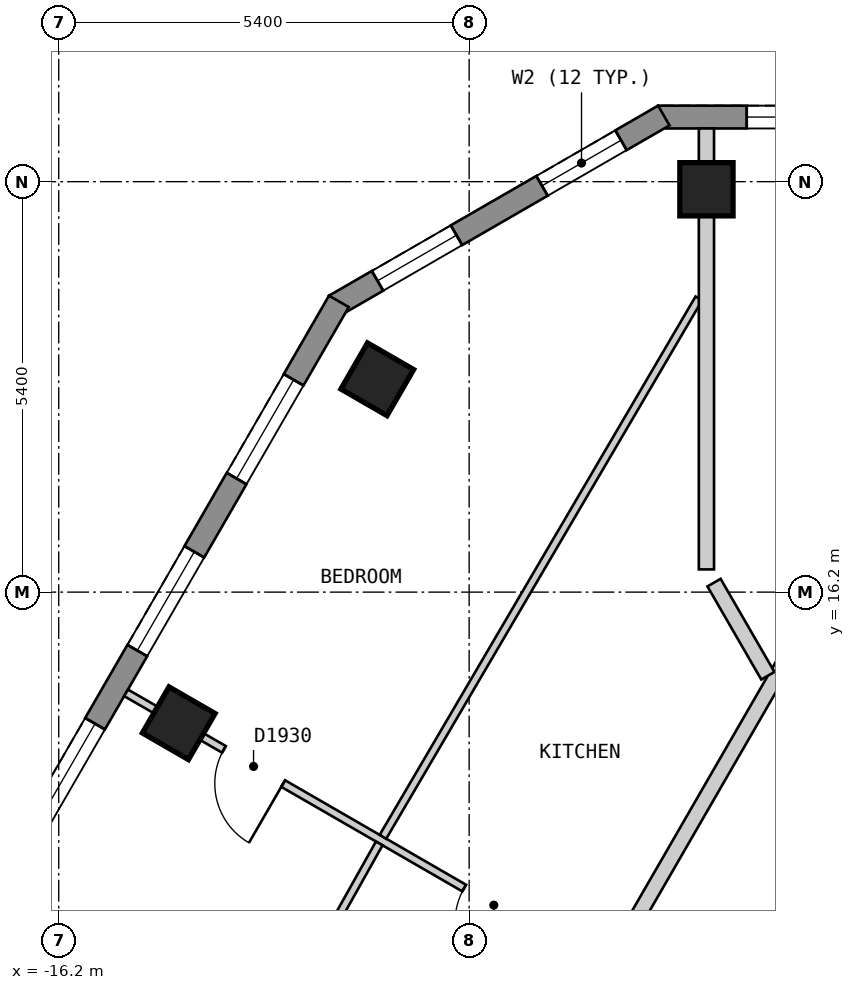
"""IFC4 building model, lengths in metres.
Left out: names, types, materials, properties, quantities, classifications, styles, units other than length and angle.
Written with IfcOpenShell. Run it as: python <this file> out.ifc"""

import sys

from ifc_helpers import new_model, si_unit, direction, frame, frame_2d, origin, origin_2d, place, context, subcontext, project, spatial, polyline, rectangle, outline, extrude, element, fill, save


model = new_model("IFC4")
c1 = context("Model", 3, precision=1e-05, world=origin(), true_north=direction((0.0, 1.0)))
c2 = subcontext(c1, "Body", "Model", "MODEL_VIEW")
j1 = project(units=[si_unit("LENGTHUNIT", "METRE"), si_unit("PLANEANGLEUNIT", "RADIAN")], contexts=[c1])
p1 = place(None, origin())
s1 = spatial("IfcSite", under=j1, at=p1, CompositionType="ELEMENT")
p2 = place(p1, origin())
s2 = spatial("IfcBuilding", under=s1, at=p2, CompositionType="ELEMENT")
p3 = place(p2, frame((0.0, 0.0, 226.8)))
s3 = spatial("IfcBuildingStorey", under=s2, at=p3, CompositionType="ELEMENT", Elevation=226.8)
for number, where, z_axis, x_axis in (
    (1, (-7.678, 21.5, 0.0), (0.0, 0.0, 1.0), (-1.0, 0.0, 0.0)),
    (2, (-12.009, 19.0, 0.0), (0.0, 0.0, 1.0), (-0.5, -0.866, 0.0)),
    (3, (-14.621, 14.475, 0.0), (0.0, 0.0, 1.0), (-0.5, -0.866, 0.0)),
):
    element("IfcColumn", number, at=place(p3, frame(where, z_axis=z_axis, x_axis=x_axis)), inside=s3, PredefinedType="COLUMN", context=c2, shape_type="SweptSolid", body=[
        extrude(rectangle(XDim=0.7, YDim=0.7, at=origin_2d()), origin(), (0.0, 0.0, 1.0), 3.0),
    ])
p4 = place(p3, frame((8.314, 22.45, 0.0), z_axis=(0.0, 0.0, 1.0), x_axis=(-1.0, 0.0, 0.0)))
e4 = element("IfcWall", 4, at=p4, inside=s3, PredefinedType="SOLIDWALL", context=c2, shape_type="SweptSolid", body=[
    extrude(outline(polyline([(0.0, -0.15), (16.628, -0.15), (16.548, 0.15), (0.08, 0.15), (0.0, -0.15)])), origin(), (0.0, 0.0, 1.0), 2.7),
])
p5 = place(p4, frame((1.165, 0.0, 0.15)))
e5 = element("IfcOpeningElement", 5, at=p5, cuts=e4, PredefinedType="OPENING", context=c2, shape_type="SweptSolid", body=[
    extrude(rectangle(XDim=1.5, YDim=2.1, at=frame_2d((0.75, 1.05))), frame((0.0, 0.16, 0.0), z_axis=(0.0, -1.0, 0.0), x_axis=(1.0, 0.0, 0.0)), (0.0, 0.0, 1.0), 0.32),
])
p6 = place(p4, frame((3.724, 0.0, 0.15)))
e6 = element("IfcOpeningElement", 6, at=p6, cuts=e4, PredefinedType="OPENING", context=c2, shape_type="SweptSolid", body=[
    extrude(rectangle(XDim=1.5, YDim=2.1, at=frame_2d((0.75, 1.05))), frame((0.0, 0.16, 0.0), z_axis=(0.0, -1.0, 0.0), x_axis=(1.0, 0.0, 0.0)), (0.0, 0.0, 1.0), 0.32),
])
p7 = place(p4, frame((6.284, 0.0, 0.15)))
e7 = element("IfcOpeningElement", 7, at=p7, cuts=e4, PredefinedType="OPENING", context=c2, shape_type="SweptSolid", body=[
    extrude(rectangle(XDim=1.5, YDim=2.1, at=frame_2d((0.75, 1.05))), frame((0.0, 0.16, 0.0), z_axis=(0.0, -1.0, 0.0), x_axis=(1.0, 0.0, 0.0)), (0.0, 0.0, 1.0), 0.32),
])
p8 = place(p4, frame((8.843, 0.0, 0.15)))
e8 = element("IfcOpeningElement", 8, at=p8, cuts=e4, PredefinedType="OPENING", context=c2, shape_type="SweptSolid", body=[
    extrude(rectangle(XDim=1.5, YDim=2.1, at=frame_2d((0.75, 1.05))), frame((0.0, 0.16, 0.0), z_axis=(0.0, -1.0, 0.0), x_axis=(1.0, 0.0, 0.0)), (0.0, 0.0, 1.0), 0.32),
])
p9 = place(p4, frame((11.403, 0.0, 0.15)))
e9 = element("IfcOpeningElement", 9, at=p9, cuts=e4, PredefinedType="OPENING", context=c2, shape_type="SweptSolid", body=[
    extrude(rectangle(XDim=1.5, YDim=2.1, at=frame_2d((0.75, 1.05))), frame((0.0, 0.16, 0.0), z_axis=(0.0, -1.0, 0.0), x_axis=(1.0, 0.0, 0.0)), (0.0, 0.0, 1.0), 0.32),
])
p10 = place(p4, frame((13.962, 0.0, 0.15)))
e10 = element("IfcOpeningElement", 10, at=p10, cuts=e4, PredefinedType="OPENING", context=c2, shape_type="SweptSolid", body=[
    extrude(rectangle(XDim=1.5, YDim=2.1, at=frame_2d((0.75, 1.05))), frame((0.0, 0.16, 0.0), z_axis=(0.0, -1.0, 0.0), x_axis=(1.0, 0.0, 0.0)), (0.0, 0.0, 1.0), 0.32),
])
p11 = place(p3, frame((-8.239, 22.47, 0.0), z_axis=(0.0, 0.0, 1.0), x_axis=(-0.866022959057, -0.500004234368, 0.0)))
e11 = element("IfcWall", 11, at=p11, inside=s3, PredefinedType="SOLIDWALL", context=c2, shape_type="SweptSolid", body=[
    extrude(outline(polyline([(0.0, -0.15), (5.0, -0.15), (4.92, 0.15), (0.08, 0.15), (0.0, -0.15)])), origin(), (0.0, 0.0, 1.0), 2.7),
])
p12 = place(p11, frame((0.65, 0.0, 0.15)))
e12 = element("IfcOpeningElement", 12, at=p12, cuts=e11, PredefinedType="OPENING", context=c2, shape_type="SweptSolid", body=[
    extrude(rectangle(XDim=1.2, YDim=2.1, at=frame_2d((0.6, 1.05))), frame((0.0, 0.16, 0.0), z_axis=(0.0, -1.0, 0.0), x_axis=(1.0, 0.0, 0.0)), (0.0, 0.0, 1.0), 0.32),
])
p13 = place(p11, frame((3.149, 0.0, 0.15)))
e13 = element("IfcOpeningElement", 13, at=p13, cuts=e11, PredefinedType="OPENING", context=c2, shape_type="SweptSolid", body=[
    extrude(rectangle(XDim=1.2, YDim=2.1, at=frame_2d((0.6, 1.05))), frame((0.0, 0.16, 0.0), z_axis=(0.0, -1.0, 0.0), x_axis=(1.0, 0.0, 0.0)), (0.0, 0.0, 1.0), 0.32),
])
p14 = place(p3, frame((-12.514, 20.025, 0.0), z_axis=(0.0, 0.0, 1.0), x_axis=(-0.500003656944, -0.866023292436, 0.0)))
e14 = element("IfcWall", 14, at=p14, inside=s3, PredefinedType="SOLIDWALL", context=c2, shape_type="SweptSolid", body=[
    extrude(outline(polyline([(0.0, -0.15), (22.17, -0.15), (22.09, 0.15), (0.08, 0.15), (0.0, -0.15)])), origin(), (0.0, 0.0, 1.0), 2.7),
])
p15 = place(p14, frame((1.191, 0.0, 0.15)))
e15 = element("IfcOpeningElement", 15, at=p15, cuts=e14, PredefinedType="OPENING", context=c2, shape_type="SweptSolid", body=[
    extrude(rectangle(XDim=1.5, YDim=2.1, at=frame_2d((0.75, 1.05))), frame((0.0, 0.16, 0.0), z_axis=(0.0, -1.0, 0.0), x_axis=(1.0, 0.0, 0.0)), (0.0, 0.0, 1.0), 0.32),
])
p16 = place(p14, frame((3.804, 0.0, 0.15)))
e16 = element("IfcOpeningElement", 16, at=p16, cuts=e14, PredefinedType="OPENING", context=c2, shape_type="SweptSolid", body=[
    extrude(rectangle(XDim=1.5, YDim=2.1, at=frame_2d((0.75, 1.05))), frame((0.0, 0.16, 0.0), z_axis=(0.0, -1.0, 0.0), x_axis=(1.0, 0.0, 0.0)), (0.0, 0.0, 1.0), 0.32),
])
p17 = place(p14, frame((6.416, 0.0, 0.15)))
e17 = element("IfcOpeningElement", 17, at=p17, cuts=e14, PredefinedType="OPENING", context=c2, shape_type="SweptSolid", body=[
    extrude(rectangle(XDim=1.5, YDim=2.1, at=frame_2d((0.75, 1.05))), frame((0.0, 0.16, 0.0), z_axis=(0.0, -1.0, 0.0), x_axis=(1.0, 0.0, 0.0)), (0.0, 0.0, 1.0), 0.32),
])
p18 = place(p14, frame((9.029, 0.0, 0.15)))
e18 = element("IfcOpeningElement", 18, at=p18, cuts=e14, PredefinedType="OPENING", context=c2, shape_type="SweptSolid", body=[
    extrude(rectangle(XDim=1.5, YDim=2.1, at=frame_2d((0.75, 1.05))), frame((0.0, 0.16, 0.0), z_axis=(0.0, -1.0, 0.0), x_axis=(1.0, 0.0, 0.0)), (0.0, 0.0, 1.0), 0.32),
])
p19 = place(p14, frame((11.641, 0.0, 0.15)))
e19 = element("IfcOpeningElement", 19, at=p19, cuts=e14, PredefinedType="OPENING", context=c2, shape_type="SweptSolid", body=[
    extrude(rectangle(XDim=1.5, YDim=2.1, at=frame_2d((0.75, 1.05))), frame((0.0, 0.16, 0.0), z_axis=(0.0, -1.0, 0.0), x_axis=(1.0, 0.0, 0.0)), (0.0, 0.0, 1.0), 0.32),
])
p20 = place(p14, frame((14.254, 0.0, 0.15)))
e20 = element("IfcOpeningElement", 20, at=p20, cuts=e14, PredefinedType="OPENING", context=c2, shape_type="SweptSolid", body=[
    extrude(rectangle(XDim=1.5, YDim=2.1, at=frame_2d((0.75, 1.05))), frame((0.0, 0.16, 0.0), z_axis=(0.0, -1.0, 0.0), x_axis=(1.0, 0.0, 0.0)), (0.0, 0.0, 1.0), 0.32),
])
p21 = place(p14, frame((16.866, 0.0, 0.15)))
e21 = element("IfcOpeningElement", 21, at=p21, cuts=e14, PredefinedType="OPENING", context=c2, shape_type="SweptSolid", body=[
    extrude(rectangle(XDim=1.5, YDim=2.1, at=frame_2d((0.75, 1.05))), frame((0.0, 0.16, 0.0), z_axis=(0.0, -1.0, 0.0), x_axis=(1.0, 0.0, 0.0)), (0.0, 0.0, 1.0), 0.32),
])
p22 = place(p14, frame((19.479, 0.0, 0.15)))
e22 = element("IfcOpeningElement", 22, at=p22, cuts=e14, PredefinedType="OPENING", context=c2, shape_type="SweptSolid", body=[
    extrude(rectangle(XDim=1.5, YDim=2.1, at=frame_2d((0.75, 1.05))), frame((0.0, 0.16, 0.0), z_axis=(0.0, -1.0, 0.0), x_axis=(1.0, 0.0, 0.0)), (0.0, 0.0, 1.0), 0.32),
])
p23 = place(p3, frame((-10.854, 8.0, 0.0), z_axis=(0.0, 0.0, 1.0), x_axis=(0.499997637144, 0.866026767976, 0.0)))
e23 = element("IfcWall", 23, at=p23, inside=s3, PredefinedType="PARTITIONING", context=c2, shape_type="SweptSolid", body=[
    extrude(rectangle(XDim=10.854, YDim=0.2, at=frame_2d((5.427, 0.0))), origin(), (0.0, 0.0, 1.0), 2.7),
])
p24 = place(p23, frame((0.612, 0.0, 0.0)))
e24 = element("IfcOpeningElement", 24, at=p24, cuts=e23, PredefinedType="OPENING", context=c2, shape_type="SweptSolid", body=[
    extrude(rectangle(XDim=1.0, YDim=2.1, at=frame_2d((0.5, 1.05))), frame((0.0, 0.11, 0.0), z_axis=(0.0, -1.0, 0.0), x_axis=(1.0, 0.0, 0.0)), (0.0, 0.0, 1.0), 0.22),
])
p25 = place(p3, frame((-15.314, 14.875, 0.0), z_axis=(0.0, 0.0, 1.0), x_axis=(0.866001485781, -0.500041424909, 0.0)))
e25 = element("IfcWall", 25, at=p25, inside=s3, PredefinedType="PARTITIONING", context=c2, shape_type="SweptSolid", body=[
    extrude(rectangle(XDim=7.2, YDim=0.1, at=frame_2d((3.6, 0.0))), origin(), (0.0, 0.0, 1.0), 2.7),
])
p26 = place(p25, frame((5.137, 0.0, 0.0)))
e26 = element("IfcOpeningElement", 26, at=p26, cuts=e25, PredefinedType="OPENING", context=c2, shape_type="SweptSolid", body=[
    extrude(rectangle(XDim=0.9, YDim=2.1, at=frame_2d((0.45, 1.05))), frame((0.0, 0.06, 0.0), z_axis=(0.0, -1.0, 0.0), x_axis=(1.0, 0.0, 0.0)), (0.0, 0.0, 1.0), 0.12),
])
p27 = place(p25, frame((1.487, 0.0, 0.0)))
e27 = element("IfcOpeningElement", 27, at=p27, cuts=e25, PredefinedType="OPENING", context=c2, shape_type="SweptSolid", body=[
    extrude(rectangle(XDim=0.9, YDim=2.1, at=frame_2d((0.45, 1.05))), frame((0.0, 0.06, 0.0), z_axis=(0.0, -1.0, 0.0), x_axis=(1.0, 0.0, 0.0)), (0.0, 0.0, 1.0), 0.12),
])
p28 = place(p3, frame((-11.934, 12.981, 0.0), z_axis=(0.0, 0.0, 1.0), x_axis=(0.506072703404, 0.862490822484, 0.0)))
e28 = element("IfcWall", 28, at=p28, inside=s3, PredefinedType="PARTITIONING", context=c2, shape_type="SweptSolid", body=[
    extrude(rectangle(XDim=8.212, YDim=0.1, at=frame_2d((4.106, 0.0))), origin(), (0.0, 0.0, 1.0), 2.7),
])
p29 = place(p3, frame((-14.522, 8.362, 0.0), z_axis=(0.0, 0.0, 1.0), x_axis=(0.488772229601, 0.872411432508, 0.0)))
e29 = element("IfcWall", 29, at=p29, inside=s3, PredefinedType="PARTITIONING", context=c2, shape_type="SweptSolid", body=[
    extrude(rectangle(XDim=5.195, YDim=0.1, at=frame_2d((2.597, 0.0))), origin(), (0.0, 0.0, 1.0), 2.7),
])
p30 = place(p29, frame((2.173, 0.0, 0.0)))
e30 = element("IfcOpeningElement", 30, at=p30, cuts=e29, PredefinedType="OPENING", context=c2, shape_type="SweptSolid", body=[
    extrude(rectangle(XDim=0.9, YDim=2.1, at=frame_2d((0.45, 1.05))), frame((0.0, 0.06, 0.0), z_axis=(0.0, -1.0, 0.0), x_axis=(1.0, 0.0, 0.0)), (0.0, 0.0, 1.0), 0.12),
])
p31 = place(p3, frame((-7.578, 16.325, 0.0), z_axis=(0.0, 0.0, 1.0), x_axis=(0.500314976313, -0.865843475737, 0.0)))
e31 = element("IfcWall", 31, at=p31, inside=s3, PredefinedType="PARTITIONING", context=c2, shape_type="SweptSolid", body=[
    extrude(rectangle(XDim=1.415, YDim=0.2, at=frame_2d((0.707, 0.0))), origin(), (0.0, 0.0, 1.0), 2.7),
])
p32 = place(p3, frame((-7.678, 16.499, 0.0), z_axis=(0.0, 0.0, 1.0), x_axis=(0.0, 1.0, 0.0)))
e32 = element("IfcWall", 32, at=p32, inside=s3, PredefinedType="PARTITIONING", context=c2, shape_type="SweptSolid", body=[
    extrude(rectangle(XDim=5.801, YDim=0.2, at=frame_2d((2.9, 0.0))), origin(), (0.0, 0.0, 1.0), 2.7),
])
p33 = place(p10, origin())
e33 = element("IfcWindow", 33, at=p33, inside=s3, PartitioningType="SINGLE_PANEL", PredefinedType="WINDOW", context=c2, shape_type="SweptSolid", body=[
    extrude(rectangle(XDim=1.5, YDim=2.1, at=frame_2d((0.75, 1.05))), frame((0.0, 0.03, 0.0), z_axis=(0.0, -1.0, 0.0), x_axis=(1.0, 0.0, 0.0)), (0.0, 0.0, 1.0), 0.06),
])
fill(e10, e33)
p34 = place(p12, origin())
e34 = element("IfcWindow", 34, at=p34, inside=s3, PartitioningType="SINGLE_PANEL", PredefinedType="WINDOW", context=c2, shape_type="SweptSolid", body=[
    extrude(rectangle(XDim=1.2, YDim=2.1, at=frame_2d((0.6, 1.05))), frame((0.0, 0.03, 0.0), z_axis=(0.0, -1.0, 0.0), x_axis=(1.0, 0.0, 0.0)), (0.0, 0.0, 1.0), 0.06),
])
fill(e12, e34)
p35 = place(p13, origin())
e35 = element("IfcWindow", 35, at=p35, inside=s3, PartitioningType="SINGLE_PANEL", PredefinedType="WINDOW", context=c2, shape_type="SweptSolid", body=[
    extrude(rectangle(XDim=1.2, YDim=2.1, at=frame_2d((0.6, 1.05))), frame((0.0, 0.03, 0.0), z_axis=(0.0, -1.0, 0.0), x_axis=(1.0, 0.0, 0.0)), (0.0, 0.0, 1.0), 0.06),
])
fill(e13, e35)
p36 = place(p15, origin())
e36 = element("IfcWindow", 36, at=p36, inside=s3, PartitioningType="SINGLE_PANEL", PredefinedType="WINDOW", context=c2, shape_type="SweptSolid", body=[
    extrude(rectangle(XDim=1.5, YDim=2.1, at=frame_2d((0.75, 1.05))), frame((0.0, 0.03, 0.0), z_axis=(0.0, -1.0, 0.0), x_axis=(1.0, 0.0, 0.0)), (0.0, 0.0, 1.0), 0.06),
])
fill(e15, e36)
p37 = place(p16, origin())
e37 = element("IfcWindow", 37, at=p37, inside=s3, PartitioningType="SINGLE_PANEL", PredefinedType="WINDOW", context=c2, shape_type="SweptSolid", body=[
    extrude(rectangle(XDim=1.5, YDim=2.1, at=frame_2d((0.75, 1.05))), frame((0.0, 0.03, 0.0), z_axis=(0.0, -1.0, 0.0), x_axis=(1.0, 0.0, 0.0)), (0.0, 0.0, 1.0), 0.06),
])
fill(e16, e37)
p38 = place(p17, origin())
e38 = element("IfcWindow", 38, at=p38, inside=s3, PartitioningType="SINGLE_PANEL", PredefinedType="WINDOW", context=c2, shape_type="SweptSolid", body=[
    extrude(rectangle(XDim=1.5, YDim=2.1, at=frame_2d((0.75, 1.05))), frame((0.0, 0.03, 0.0), z_axis=(0.0, -1.0, 0.0), x_axis=(1.0, 0.0, 0.0)), (0.0, 0.0, 1.0), 0.06),
])
fill(e17, e38)
p39 = place(p26, origin())
e39 = element("IfcDoor", 39, at=p39, inside=s3, OperationType="SINGLE_SWING_RIGHT", PredefinedType="DOOR", context=c2, shape_type="SweptSolid", body=[
    extrude(rectangle(XDim=0.9, YDim=2.1, at=frame_2d((0.45, 1.05))), frame((0.0, 0.025, 0.0), z_axis=(0.0, -1.0, 0.0), x_axis=(1.0, 0.0, 0.0)), (0.0, 0.0, 1.0), 0.05),
])
fill(e26, e39)
p40 = place(p27, origin())
e40 = element("IfcDoor", 40, at=p40, inside=s3, OperationType="SINGLE_SWING_RIGHT", PredefinedType="DOOR", context=c2, shape_type="SweptSolid", body=[
    extrude(rectangle(XDim=0.9, YDim=2.1, at=frame_2d((0.45, 1.05))), frame((0.0, 0.025, 0.0), z_axis=(0.0, -1.0, 0.0), x_axis=(1.0, 0.0, 0.0)), (0.0, 0.0, 1.0), 0.05),
])
fill(e27, e40)
save(model, sys.argv[1])
